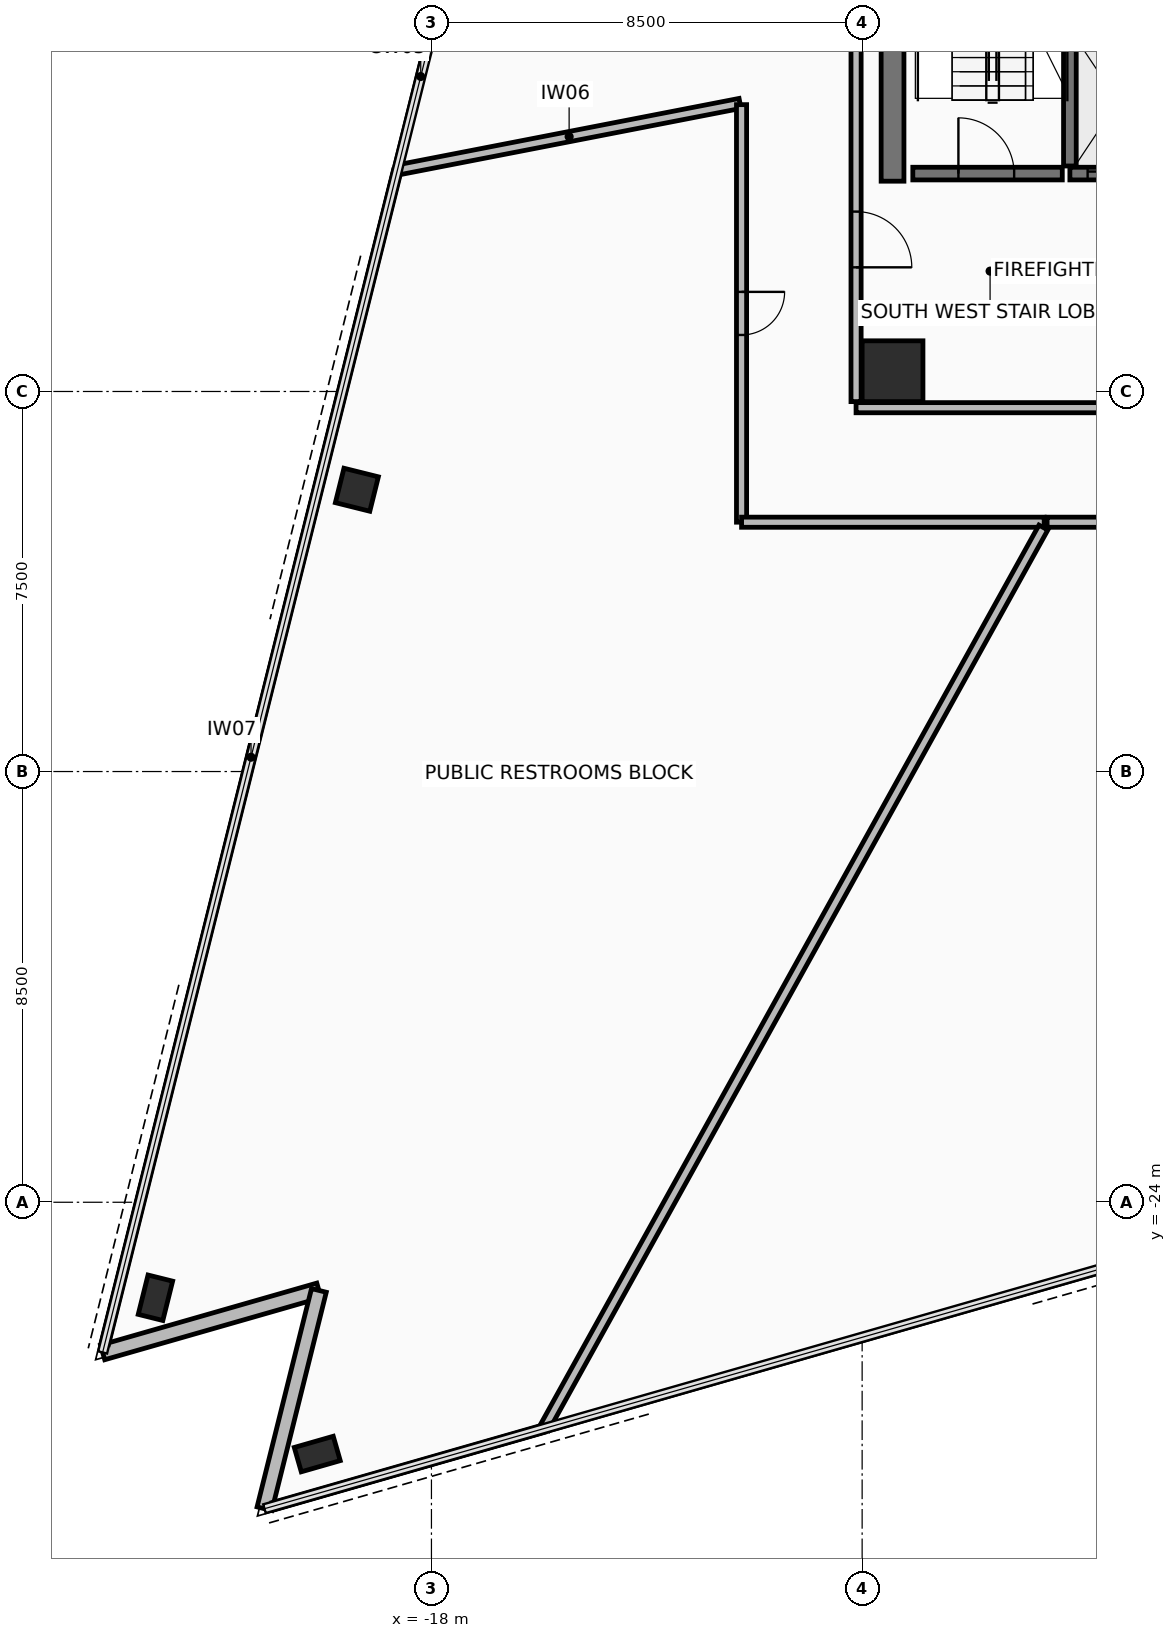
"""IFC4 building model, lengths in metres.
Left out: names, types, materials, properties, quantities, classifications, styles, units other than length and angle.
Written with IfcOpenShell. Run it as: python <this file> out.ifc"""

import sys

from ifc_helpers import new_model, si_unit, direction, frame, frame_2d, origin, origin_2d, place, context, subcontext, project, spatial, rectangle, hollow_rectangle, extrude, element, fill, save


model = new_model("IFC4")
c1 = context("Model", 3, precision=1e-05, world=origin(), true_north=direction((0.0, 1.0)))
c2 = subcontext(c1, "Body", "Model", "MODEL_VIEW")
j1 = project(units=[si_unit("LENGTHUNIT", "METRE"), si_unit("PLANEANGLEUNIT", "RADIAN")], contexts=[c1])
p1 = place(None, origin())
s1 = spatial("IfcSite", under=j1, at=p1, CompositionType="ELEMENT")
p2 = place(p1, origin())
s2 = spatial("IfcBuilding", under=s1, at=p2, CompositionType="ELEMENT")
p3 = place(p2, frame((0.0, 0.0, 96.9)))
s3 = spatial("IfcBuildingStorey", under=s2, at=p3, CompositionType="ELEMENT", Elevation=96.9)
p4 = place(p3, frame((-8.9, -7.6, 0.0), z_axis=(0.0, 0.0, 1.0), x_axis=(1.0, 0.0, 0.0)))
e1 = element("IfcColumn", 1, at=p4, inside=s3, PredefinedType="COLUMN", context=c2, shape_type="SweptSolid", body=[
    extrude(rectangle(XDim=1.2, YDim=1.2, at=origin_2d()), origin(), (0.0, 0.0, 1.0), 3.6),
])
p5 = place(p3, frame((-19.472, -9.939, 0.0), z_axis=(0.0, 0.0, 1.0), x_axis=(0.2419218956, 0.970295726276, 0.0)))
e2 = element("IfcColumn", 2, at=p5, inside=s3, PredefinedType="COLUMN", context=c2, shape_type="SweptSolid", body=[
    extrude(hollow_rectangle(XDim=0.7, YDim=0.7, WallThickness=0.04, at=origin_2d()), origin(), (0.0, 0.0, 1.0), 3.6),
])
for number, where, z_axis, x_axis in (
    (3, (-23.447, -25.885, 0.0), (0.0, 0.0, 1.0), (0.242, 0.97, 0.0)),
    (4, (-20.253, -28.969, 0.0), (0.0, 0.0, 1.0), (0.961, 0.276, 0.0)),
):
    element("IfcColumn", number, at=place(p3, frame(where, z_axis=z_axis, x_axis=x_axis)), inside=s3, PredefinedType="COLUMN", context=c2, shape_type="SweptSolid", body=[
        extrude(hollow_rectangle(XDim=0.5, YDim=0.8, WallThickness=0.04, at=origin_2d()), origin(), (0.0, 0.0, 1.0), 3.6),
    ])
p6 = place(p3, frame((-24.489, -26.964, 0.0), z_axis=(0.0, 0.0, 1.0), x_axis=(0.961259988927, 0.275643308803, 0.0)))
e5 = element("IfcWall", 5, at=p6, inside=s3, PredefinedType="STANDARD", context=c2, shape_type="SweptSolid", body=[
    extrude(rectangle(XDim=4.44, YDim=0.3, at=frame_2d((2.22, 0.0))), origin(), (0.0, 0.0, 1.0), 2.605),
])
p7 = place(p3, frame((-20.221, -25.74, 0.0), z_axis=(0.0, 0.0, 1.0), x_axis=(-0.241940431812, -0.970291104491, 0.0)))
e6 = element("IfcWall", 6, at=p7, inside=s3, PredefinedType="STANDARD", context=c2, shape_type="SweptSolid", body=[
    extrude(rectangle(XDim=4.44, YDim=0.3, at=frame_2d((2.22, 0.0))), origin(), (0.0, 0.0, 1.0), 2.605),
])
p8 = place(p3, frame((-8.9, -3.85, 0.0), z_axis=(0.0, 0.0, 1.0), x_axis=(0.0, 1.0, 0.0)))
e7 = element("IfcWall", 7, at=p8, inside=s3, PredefinedType="SHEAR", context=c2, shape_type="SweptSolid", body=[
    extrude(rectangle(XDim=10.7, YDim=0.45, at=frame_2d((5.35, 0.0))), origin(), (0.0, 0.0, 1.0), 3.41),
])
p9 = place(p3, frame((-9.62, -8.32, 0.0), z_axis=(0.0, 0.0, 1.0), x_axis=(1.0, 0.0, 0.0)))
e8 = element("IfcWall", 8, at=p9, inside=s3, PredefinedType="PARTITIONING", context=c2, shape_type="SweptSolid", body=[
    extrude(rectangle(XDim=19.24, YDim=0.2, at=frame_2d((9.62, 0.0))), origin(), (0.0, 0.0, 1.0), 2.805),
])
p10 = place(p9, frame((7.37, 0.0, 0.0)))
e9 = element("IfcOpeningElement", 9, at=p10, cuts=e8, PredefinedType="OPENING", context=c2, shape_type="SweptSolid", body=[
    extrude(rectangle(XDim=0.9, YDim=2.1, at=frame_2d((0.45, 1.05))), frame((0.0, 0.11, 0.0), z_axis=(0.0, -1.0, 0.0), x_axis=(1.0, 0.0, 0.0)), (0.0, 0.0, 1.0), 0.22),
])
p11 = place(p9, frame((10.77, 0.0, 0.0)))
e10 = element("IfcOpeningElement", 10, at=p11, cuts=e8, PredefinedType="OPENING", context=c2, shape_type="SweptSolid", body=[
    extrude(rectangle(XDim=0.9, YDim=2.1, at=frame_2d((0.45, 1.05))), frame((0.0, 0.11, 0.0), z_axis=(0.0, -1.0, 0.0), x_axis=(1.0, 0.0, 0.0)), (0.0, 0.0, 1.0), 0.22),
])
p12 = place(p9, frame((13.97, 0.0, 0.0)))
e11 = element("IfcOpeningElement", 11, at=p12, cuts=e8, PredefinedType="OPENING", context=c2, shape_type="SweptSolid", body=[
    extrude(rectangle(XDim=0.9, YDim=2.1, at=frame_2d((0.45, 1.05))), frame((0.0, 0.11, 0.0), z_axis=(0.0, -1.0, 0.0), x_axis=(1.0, 0.0, 0.0)), (0.0, 0.0, 1.0), 0.22),
])
p13 = place(p3, frame((-9.62, 8.2, 0.0), z_axis=(0.0, 0.0, 1.0), x_axis=(0.0, -1.0, 0.0)))
e12 = element("IfcWall", 12, at=p13, inside=s3, PredefinedType="PARTITIONING", context=c2, shape_type="SweptSolid", body=[
    extrude(rectangle(XDim=16.4, YDim=0.2, at=frame_2d((8.2, 0.0))), origin(), (0.0, 0.0, 1.0), 2.805),
])
p14 = place(p13, frame((12.65, 0.0, 0.0)))
e13 = element("IfcOpeningElement", 13, at=p14, cuts=e12, PredefinedType="OPENING", context=c2, shape_type="SweptSolid", body=[
    extrude(rectangle(XDim=1.1, YDim=2.15, at=frame_2d((0.55, 1.075))), frame((0.0, 0.11, 0.0), z_axis=(0.0, -1.0, 0.0), x_axis=(1.0, 0.0, 0.0)), (0.0, 0.0, 1.0), 0.22),
])
p15 = place(p3, frame((-5.4, -3.55, 0.0), z_axis=(0.0, 0.0, 1.0), x_axis=(0.0, 1.0, 0.0)))
e14 = element("IfcWall", 14, at=p15, inside=s3, PredefinedType="SHEAR", context=c2, shape_type="SweptSolid", body=[
    extrude(rectangle(XDim=7.3, YDim=0.25, at=frame_2d((3.65, 0.0))), origin(), (0.0, 0.0, 1.0), 3.41),
])
p16 = place(p3, frame((-8.5, -3.7, 0.0), z_axis=(0.0, 0.0, 1.0), x_axis=(1.0, 0.0, 0.0)))
e15 = element("IfcWall", 15, at=p16, inside=s3, PredefinedType="SHEAR", context=c2, shape_type="SweptSolid", body=[
    extrude(rectangle(XDim=2.95, YDim=0.25, at=frame_2d((1.475, 0.0))), origin(), (0.0, 0.0, 1.0), 3.41),
])
p17 = place(p16, frame((0.9, 0.0, 0.0)))
e16 = element("IfcOpeningElement", 16, at=p17, cuts=e15, PredefinedType="OPENING", context=c2, shape_type="SweptSolid", body=[
    extrude(rectangle(XDim=1.1, YDim=2.15, at=frame_2d((0.55, 1.075))), frame((0.0, 0.135, 0.0), z_axis=(0.0, -1.0, 0.0), x_axis=(1.0, 0.0, 0.0)), (0.0, 0.0, 1.0), 0.27),
])
p18 = place(p3, frame((-5.4, -3.7, 0.0), z_axis=(0.0, 0.0, 1.0), x_axis=(1.0, 0.0, 0.0)))
e17 = element("IfcWall", 17, at=p18, inside=s3, PredefinedType="SHEAR", context=c2, shape_type="SweptSolid", body=[
    extrude(rectangle(XDim=1.9, YDim=0.25, at=frame_2d((0.95, 0.0))), origin(), (0.0, 0.0, 1.0), 3.41),
])
p19 = place(p18, frame((0.35, 0.0, 0.0)))
e18 = element("IfcOpeningElement", 18, at=p19, cuts=e17, PredefinedType="OPENING", context=c2, shape_type="SweptSolid", body=[
    extrude(rectangle(XDim=1.2, YDim=2.2, at=frame_2d((0.6, 1.1))), frame((0.0, 0.135, 0.0), z_axis=(0.0, -1.0, 0.0), x_axis=(1.0, 0.0, 0.0)), (0.0, 0.0, 1.0), 0.27),
])
p20 = place(p3, frame((-24.446, -26.79, 0.0), z_axis=(0.0, 0.0, 1.0), x_axis=(0.241923887104, 0.970295229736, 0.0)))
e19 = element("IfcWall", 19, at=p20, inside=s3, PredefinedType="PARTITIONING", context=c2, shape_type="SweptSolid", body=[
    extrude(rectangle(XDim=23.854, YDim=0.15, at=frame_2d((11.927, 0.0))), origin(), (0.0, 0.0, 1.0), 3.41),
])
p21 = place(p3, frame((-18.656, -3.626, 0.0), z_axis=(0.0, 0.0, 1.0), x_axis=(0.981626666558, 0.190811654522, 0.0)))
e20 = element("IfcWall", 20, at=p21, inside=s3, PredefinedType="PARTITIONING", context=c2, shape_type="SweptSolid", body=[
    extrude(rectangle(XDim=6.872, YDim=0.2, at=frame_2d((3.436, 0.0))), origin(), (0.0, 0.0, 1.0), 2.605),
])
p22 = place(p3, frame((-11.88, -2.34, 0.0), z_axis=(0.0, 0.0, 1.0), x_axis=(0.0, -1.0, 0.0)))
e21 = element("IfcWall", 21, at=p22, inside=s3, PredefinedType="PARTITIONING", context=c2, shape_type="SweptSolid", body=[
    extrude(rectangle(XDim=8.24, YDim=0.2, at=frame_2d((4.12, 0.0))), origin(), (0.0, 0.0, 1.0), 2.805),
])
p23 = place(p22, frame((3.695, 0.0, 0.0)))
e22 = element("IfcOpeningElement", 22, at=p23, cuts=e21, PredefinedType="OPENING", context=c2, shape_type="SweptSolid", body=[
    extrude(rectangle(XDim=0.85, YDim=2.1, at=frame_2d((0.425, 1.05))), frame((0.0, 0.11, 0.0), z_axis=(0.0, -1.0, 0.0), x_axis=(1.0, 0.0, 0.0)), (0.0, 0.0, 1.0), 0.22),
])
p24 = place(p3, frame((-11.879, -10.58, 0.0), z_axis=(0.0, 0.0, 1.0), x_axis=(1.0, 0.0, 0.0)))
e23 = element("IfcWall", 23, at=p24, inside=s3, PredefinedType="PARTITIONING", context=c2, shape_type="SweptSolid", body=[
    extrude(rectangle(XDim=5.972, YDim=0.2, at=frame_2d((2.986, 0.0))), origin(), (0.0, 0.0, 1.0), 2.805),
])
p25 = place(p3, frame((-5.923, -10.685, 0.0), z_axis=(0.0, 0.0, 1.0), x_axis=(-0.484811285835, -0.874618783886, 0.0)))
e24 = element("IfcWall", 24, at=p25, inside=s3, PredefinedType="PARTITIONING", context=c2, shape_type="SweptSolid", body=[
    extrude(rectangle(XDim=20.319, YDim=0.2, at=frame_2d((10.16, 0.0))), origin(), (0.0, 0.0, 1.0), 2.605),
])
p26 = place(p3, frame((-15.789, -28.469, 0.0), z_axis=(0.0, 0.0, 1.0), x_axis=(-0.96125788929, -0.275650630831, 0.0)))
e25 = element("IfcWall", 25, at=p26, inside=s3, PredefinedType="PARTITIONING", context=c2, shape_type="SweptSolid", body=[
    extrude(rectangle(XDim=5.55, YDim=0.15, at=frame_2d((2.775, 0.0))), origin(), (0.0, 0.0, 1.0), 3.41),
])
p27 = place(p3, frame((-5.85, -10.58, 0.0), z_axis=(0.0, 0.0, 1.0), x_axis=(1.0, 0.0, 0.0)))
e26 = element("IfcWall", 26, at=p27, inside=s3, PredefinedType="PARTITIONING", context=c2, shape_type="SweptSolid", body=[
    extrude(rectangle(XDim=9.269, YDim=0.2, at=frame_2d((4.635, 0.0))), origin(), (0.0, 0.0, 1.0), 2.805),
])
p28 = place(p27, frame((4.135, 0.0, 0.0)))
e27 = element("IfcOpeningElement", 27, at=p28, cuts=e26, PredefinedType="OPENING", context=c2, shape_type="SweptSolid", body=[
    extrude(rectangle(XDim=1.0, YDim=2.15, at=frame_2d((0.5, 1.075))), frame((0.0, 0.11, 0.0), z_axis=(0.0, -1.0, 0.0), x_axis=(1.0, 0.0, 0.0)), (0.0, 0.0, 1.0), 0.22),
])
p29 = place(p14, frame((1.1, 0.0, 0.0), z_axis=(0.0, 0.0, 1.0), x_axis=(-1.0, 0.0, 0.0)))
e28 = element("IfcDoor", 28, at=p29, inside=s3, OperationType="SINGLE_SWING_LEFT", PredefinedType="DOOR", context=c2, shape_type="SweptSolid", body=[
    extrude(rectangle(XDim=1.1, YDim=2.15, at=frame_2d((0.55, 1.075))), frame((0.0, 0.025, 0.0), z_axis=(0.0, -1.0, 0.0), x_axis=(1.0, 0.0, 0.0)), (0.0, 0.0, 1.0), 0.05),
])
fill(e13, e28)
p30 = place(p17, origin())
e29 = element("IfcDoor", 29, at=p30, inside=s3, OperationType="SINGLE_SWING_LEFT", PredefinedType="DOOR", context=c2, shape_type="SweptSolid", body=[
    extrude(rectangle(XDim=1.1, YDim=2.15, at=frame_2d((0.55, 1.075))), frame((0.0, 0.025, 0.0), z_axis=(0.0, -1.0, 0.0), x_axis=(1.0, 0.0, 0.0)), (0.0, 0.0, 1.0), 0.05),
])
fill(e16, e29)
p31 = place(p19, origin())
e30 = element("IfcDoor", 30, at=p31, inside=s3, OperationType="SLIDING_TO_RIGHT", PredefinedType="DOOR", context=c2, shape_type="SweptSolid", body=[
    extrude(rectangle(XDim=1.2, YDim=2.2, at=frame_2d((0.6, 1.1))), frame((0.0, 0.025, 0.0), z_axis=(0.0, -1.0, 0.0), x_axis=(1.0, 0.0, 0.0)), (0.0, 0.0, 1.0), 0.05),
])
fill(e18, e30)
p32 = place(p23, origin())
e31 = element("IfcDoor", 31, at=p32, inside=s3, OperationType="SINGLE_SWING_RIGHT", PredefinedType="DOOR", context=c2, shape_type="SweptSolid", body=[
    extrude(rectangle(XDim=0.85, YDim=2.1, at=frame_2d((0.425, 1.05))), frame((0.0, 0.025, 0.0), z_axis=(0.0, -1.0, 0.0), x_axis=(1.0, 0.0, 0.0)), (0.0, 0.0, 1.0), 0.05),
])
fill(e22, e31)
save(model, sys.argv[1])
